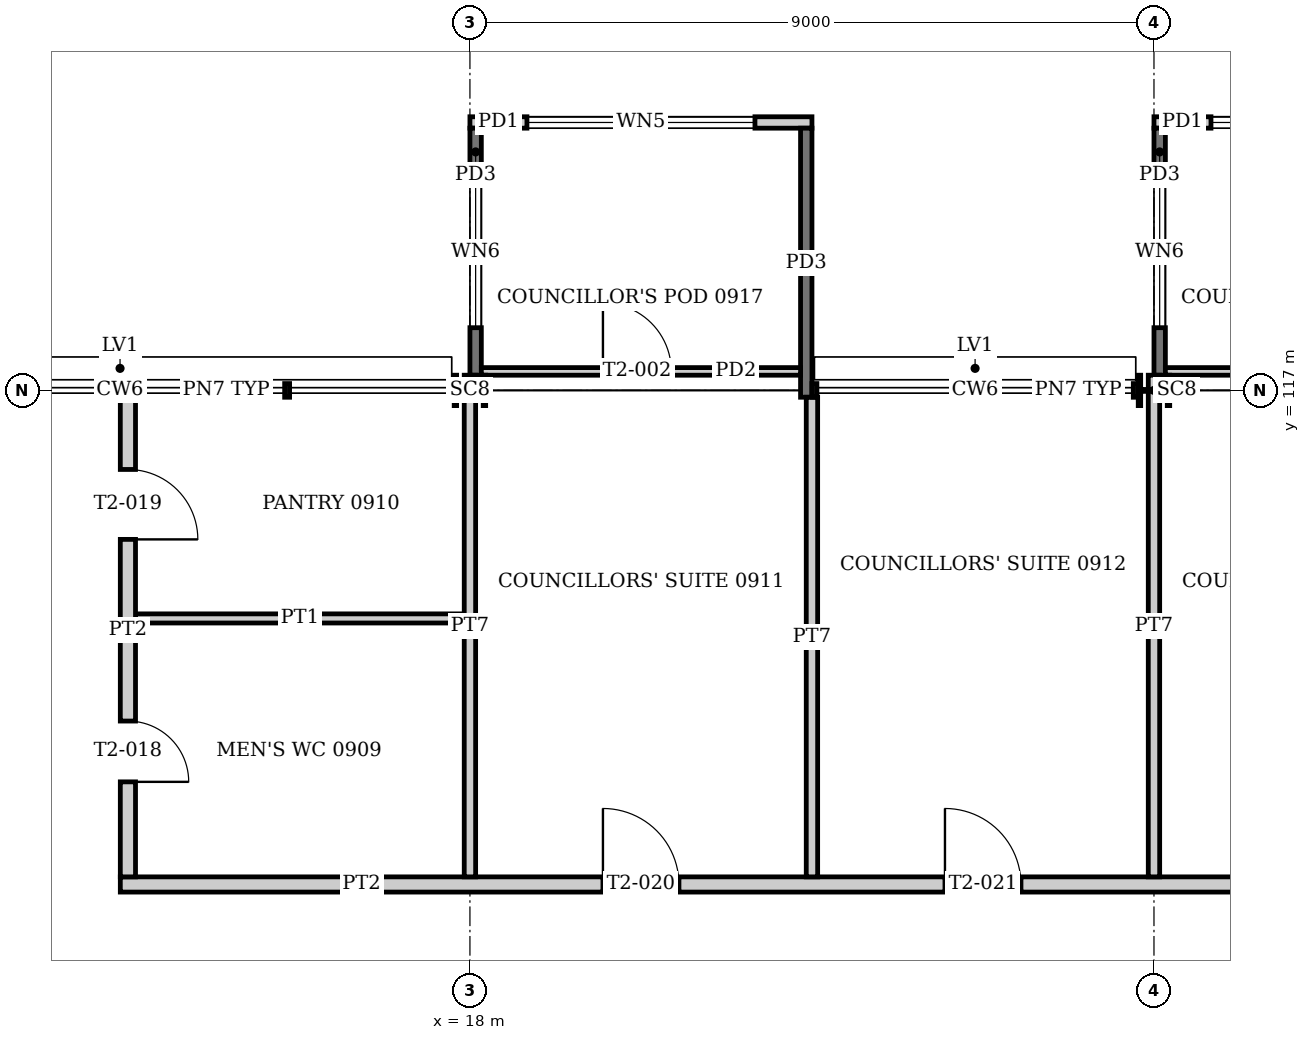
"""IFC4 building model, lengths in metres.
Left out: names, types, materials, properties, quantities, classifications, styles, units other than length and angle.
Written with IfcOpenShell. Run it as: python <this file> out.ifc"""

import sys

from ifc_helpers import new_model, si_unit, direction, frame, frame_2d, origin, origin_2d, place, context, subcontext, project, spatial, rectangle, i_section, extrude, element, fill, save


model = new_model("IFC4")
c1 = context("Model", 3, precision=1e-05, world=origin(), true_north=direction((0.0, 1.0)))
c2 = subcontext(c1, "Body", "Model", "MODEL_VIEW")
j1 = project(units=[si_unit("LENGTHUNIT", "METRE"), si_unit("PLANEANGLEUNIT", "RADIAN")], contexts=[c1])
p1 = place(None, origin())
s1 = spatial("IfcSite", under=j1, at=p1, CompositionType="ELEMENT")
p2 = place(p1, origin())
s2 = spatial("IfcBuilding", under=s1, at=p2, CompositionType="ELEMENT")
p3 = place(p2, frame((0.0, 0.0, 39.2)))
s3 = spatial("IfcBuildingStorey", under=s2, at=p3, CompositionType="ELEMENT", Elevation=39.2)
for number, where, z_axis, x_axis in (
    (1, (18.0, 117.0, 0.0), (0.0, 0.0, 1.0), (0.0, 1.0, 0.0)),
    (2, (27.0, 117.0, 0.0), (0.0, 0.0, 1.0), (0.0, 1.0, 0.0)),
):
    element("IfcColumn", number, at=place(p3, frame(where, z_axis=z_axis, x_axis=x_axis)), inside=s3, PredefinedType="COLUMN", context=c2, shape_type="SweptSolid", body=[
        extrude(i_section(OverallWidth=0.4, OverallDepth=0.414, WebThickness=0.025, FlangeThickness=0.032, at=origin_2d()), origin(), (0.0, 0.0, 1.0), 4.0),
    ])
p4 = place(p3, frame((18.0, 120.525, 0.0), z_axis=(0.0, 0.0, 1.0), x_axis=(1.0, 0.0, 0.0)))
e3 = element("IfcWall", 3, at=p4, inside=s3, PredefinedType="SOLIDWALL", context=c2, shape_type="SweptSolid", body=[
    extrude(rectangle(XDim=4.5, YDim=0.15, at=frame_2d((2.25, 0.0))), origin(), (0.0, 0.0, 1.0), 2.6),
])
p5 = place(p4, frame((0.75, 0.0, 0.9)))
e4 = element("IfcOpeningElement", 4, at=p5, cuts=e3, PredefinedType="OPENING", context=c2, shape_type="SweptSolid", body=[
    extrude(rectangle(XDim=3.0, YDim=1.4, at=frame_2d((1.5, 0.7))), frame((0.0, 0.085, 0.0), z_axis=(0.0, -1.0, 0.0), x_axis=(1.0, 0.0, 0.0)), (0.0, 0.0, 1.0), 0.17),
])
p6 = place(p3, frame((18.075, 120.45, -0.15), z_axis=(0.0, 0.0, 1.0), x_axis=(0.0, -1.0, 0.0)))
e5 = element("IfcWall", 5, at=p6, inside=s3, PredefinedType="SOLIDWALL", context=c2, shape_type="SweptSolid", body=[
    extrude(rectangle(XDim=3.25, YDim=0.15, at=frame_2d((1.625, 0.0))), origin(), (0.0, 0.0, 1.0), 2.75),
])
p7 = place(p6, frame((0.625, 0.0, 1.05)))
e6 = element("IfcOpeningElement", 6, at=p7, cuts=e5, PredefinedType="OPENING", context=c2, shape_type="SweptSolid", body=[
    extrude(rectangle(XDim=2.0, YDim=1.4, at=frame_2d((1.0, 0.7))), frame((0.0, 0.085, 0.0), z_axis=(0.0, -1.0, 0.0), x_axis=(1.0, 0.0, 0.0)), (0.0, 0.0, 1.0), 0.17),
])
p8 = place(p3, frame((22.425, 120.45, -0.15), z_axis=(0.0, 0.0, 1.0), x_axis=(0.0, -1.0, 0.0)))
e7 = element("IfcWall", 7, at=p8, inside=s3, PredefinedType="SOLIDWALL", context=c2, shape_type="SweptSolid", body=[
    extrude(rectangle(XDim=3.54, YDim=0.15, at=frame_2d((1.77, 0.0))), origin(), (0.0, 0.0, 1.0), 2.75),
])
p9 = place(p3, frame((18.15, 117.25, 0.0), z_axis=(0.0, 0.0, 1.0), x_axis=(1.0, 0.0, 0.0)))
e8 = element("IfcWall", 8, at=p9, inside=s3, PredefinedType="PARTITIONING", context=c2, shape_type="SweptSolid", body=[
    extrude(rectangle(XDim=4.2, YDim=0.1, at=frame_2d((2.1, 0.0))), origin(), (0.0, 0.0, 1.0), 2.6),
])
p10 = place(p9, frame((1.6, 0.0, 0.0)))
e9 = element("IfcOpeningElement", 9, at=p10, cuts=e8, PredefinedType="OPENING", context=c2, shape_type="SweptSolid", body=[
    extrude(rectangle(XDim=0.9, YDim=2.1, at=frame_2d((0.45, 1.05))), frame((0.0, 0.06, 0.0), z_axis=(0.0, -1.0, 0.0), x_axis=(1.0, 0.0, 0.0)), (0.0, 0.0, 1.0), 0.12),
])
p11 = place(p3, frame((27.0, 120.525, 0.0), z_axis=(0.0, 0.0, 1.0), x_axis=(1.0, 0.0, 0.0)))
e10 = element("IfcWall", 10, at=p11, inside=s3, PredefinedType="SOLIDWALL", context=c2, shape_type="SweptSolid", body=[
    extrude(rectangle(XDim=4.5, YDim=0.15, at=frame_2d((2.25, 0.0))), origin(), (0.0, 0.0, 1.0), 2.6),
])
p12 = place(p11, frame((0.75, 0.0, 0.9)))
e11 = element("IfcOpeningElement", 11, at=p12, cuts=e10, PredefinedType="OPENING", context=c2, shape_type="SweptSolid", body=[
    extrude(rectangle(XDim=3.0, YDim=1.4, at=frame_2d((1.5, 0.7))), frame((0.0, 0.085, 0.0), z_axis=(0.0, -1.0, 0.0), x_axis=(1.0, 0.0, 0.0)), (0.0, 0.0, 1.0), 0.17),
])
p13 = place(p3, frame((27.075, 120.45, -0.15), z_axis=(0.0, 0.0, 1.0), x_axis=(0.0, -1.0, 0.0)))
e12 = element("IfcWall", 12, at=p13, inside=s3, PredefinedType="SOLIDWALL", context=c2, shape_type="SweptSolid", body=[
    extrude(rectangle(XDim=3.25, YDim=0.15, at=frame_2d((1.625, 0.0))), origin(), (0.0, 0.0, 1.0), 2.75),
])
p14 = place(p13, frame((0.625, 0.0, 1.05)))
e13 = element("IfcOpeningElement", 13, at=p14, cuts=e12, PredefinedType="OPENING", context=c2, shape_type="SweptSolid", body=[
    extrude(rectangle(XDim=2.0, YDim=1.4, at=frame_2d((1.0, 0.7))), frame((0.0, 0.085, 0.0), z_axis=(0.0, -1.0, 0.0), x_axis=(1.0, 0.0, 0.0)), (0.0, 0.0, 1.0), 0.17),
])
p15 = place(p3, frame((27.15, 117.25, 0.0), z_axis=(0.0, 0.0, 1.0), x_axis=(1.0, 0.0, 0.0)))
e14 = element("IfcWall", 14, at=p15, inside=s3, PredefinedType="PARTITIONING", context=c2, shape_type="SweptSolid", body=[
    extrude(rectangle(XDim=4.2, YDim=0.1, at=frame_2d((2.1, 0.0))), origin(), (0.0, 0.0, 1.0), 2.6),
])
p16 = place(p15, frame((1.6, 0.0, 0.0)))
e15 = element("IfcOpeningElement", 15, at=p16, cuts=e14, PredefinedType="OPENING", context=c2, shape_type="SweptSolid", body=[
    extrude(rectangle(XDim=0.9, YDim=2.1, at=frame_2d((0.45, 1.05))), frame((0.0, 0.06, 0.0), z_axis=(0.0, -1.0, 0.0), x_axis=(1.0, 0.0, 0.0)), (0.0, 0.0, 1.0), 0.12),
])
p17 = place(p3, frame((13.4, 110.5, 0.0), z_axis=(0.0, 0.0, 1.0), x_axis=(1.0, 0.0, 0.0)))
e16 = element("IfcWall", 16, at=p17, inside=s3, PredefinedType="PARTITIONING", context=c2, shape_type="SweptSolid", body=[
    extrude(rectangle(XDim=27.2, YDim=0.2, at=frame_2d((13.6, 0.0))), origin(), (0.0, 0.0, 1.0), 3.05),
])
p18 = place(p17, frame((6.35, 0.0, 0.0)))
e17 = element("IfcOpeningElement", 17, at=p18, cuts=e16, PredefinedType="OPENING", context=c2, shape_type="SweptSolid", body=[
    extrude(rectangle(XDim=1.0, YDim=2.1, at=frame_2d((0.5, 1.05))), frame((0.0, 0.11, 0.0), z_axis=(0.0, -1.0, 0.0), x_axis=(1.0, 0.0, 0.0)), (0.0, 0.0, 1.0), 0.22),
])
p19 = place(p17, frame((10.85, 0.0, 0.0)))
e18 = element("IfcOpeningElement", 18, at=p19, cuts=e16, PredefinedType="OPENING", context=c2, shape_type="SweptSolid", body=[
    extrude(rectangle(XDim=1.0, YDim=2.1, at=frame_2d((0.5, 1.05))), frame((0.0, 0.11, 0.0), z_axis=(0.0, -1.0, 0.0), x_axis=(1.0, 0.0, 0.0)), (0.0, 0.0, 1.0), 0.22),
])
p20 = place(p17, frame((15.35, 0.0, 0.0)))
e19 = element("IfcOpeningElement", 19, at=p20, cuts=e16, PredefinedType="OPENING", context=c2, shape_type="SweptSolid", body=[
    extrude(rectangle(XDim=1.0, YDim=2.1, at=frame_2d((0.5, 1.05))), frame((0.0, 0.11, 0.0), z_axis=(0.0, -1.0, 0.0), x_axis=(1.0, 0.0, 0.0)), (0.0, 0.0, 1.0), 0.22),
])
p21 = place(p17, frame((19.85, 0.0, 0.0)))
e20 = element("IfcOpeningElement", 20, at=p21, cuts=e16, PredefinedType="OPENING", context=c2, shape_type="SweptSolid", body=[
    extrude(rectangle(XDim=1.0, YDim=2.1, at=frame_2d((0.5, 1.05))), frame((0.0, 0.11, 0.0), z_axis=(0.0, -1.0, 0.0), x_axis=(1.0, 0.0, 0.0)), (0.0, 0.0, 1.0), 0.22),
])
p22 = place(p17, frame((24.35, 0.0, 0.0)))
e21 = element("IfcOpeningElement", 21, at=p22, cuts=e16, PredefinedType="OPENING", context=c2, shape_type="SweptSolid", body=[
    extrude(rectangle(XDim=1.0, YDim=2.1, at=frame_2d((0.5, 1.05))), frame((0.0, 0.11, 0.0), z_axis=(0.0, -1.0, 0.0), x_axis=(1.0, 0.0, 0.0)), (0.0, 0.0, 1.0), 0.22),
])
p23 = place(p3, frame((13.6, 114.0, 0.0), z_axis=(0.0, 0.0, 1.0), x_axis=(1.0, 0.0, 0.0)))
e22 = element("IfcWall", 22, at=p23, inside=s3, PredefinedType="PARTITIONING", context=c2, shape_type="SweptSolid", body=[
    extrude(rectangle(XDim=4.325, YDim=0.12, at=frame_2d((2.163, 0.0))), origin(), (0.0, 0.0, 1.0), 3.05),
])
p24 = place(p3, frame((13.5, 110.6, 0.0), z_axis=(0.0, 0.0, 1.0), x_axis=(0.0, 1.0, 0.0)))
e23 = element("IfcWall", 23, at=p24, inside=s3, PredefinedType="PARTITIONING", context=c2, shape_type="SweptSolid", body=[
    extrude(rectangle(XDim=6.31, YDim=0.2, at=frame_2d((3.155, 0.0))), origin(), (0.0, 0.0, 1.0), 3.05),
])
p25 = place(p24, frame((1.25, 0.0, 0.0)))
e24 = element("IfcOpeningElement", 24, at=p25, cuts=e23, PredefinedType="OPENING", context=c2, shape_type="SweptSolid", body=[
    extrude(rectangle(XDim=0.8, YDim=2.1, at=frame_2d((0.4, 1.05))), frame((0.0, 0.11, 0.0), z_axis=(0.0, -1.0, 0.0), x_axis=(1.0, 0.0, 0.0)), (0.0, 0.0, 1.0), 0.22),
])
p26 = place(p24, frame((4.44, 0.0, 0.0)))
e25 = element("IfcOpeningElement", 25, at=p26, cuts=e23, PredefinedType="OPENING", context=c2, shape_type="SweptSolid", body=[
    extrude(rectangle(XDim=0.92, YDim=2.1, at=frame_2d((0.46, 1.05))), frame((0.0, 0.11, 0.0), z_axis=(0.0, -1.0, 0.0), x_axis=(1.0, 0.0, 0.0)), (0.0, 0.0, 1.0), 0.22),
])
p27 = place(p3, frame((18.0, 110.6, 0.0), z_axis=(0.0, 0.0, 1.0), x_axis=(0.0, 1.0, 0.0)))
e26 = element("IfcWall", 26, at=p27, inside=s3, PredefinedType="PARTITIONING", context=c2, shape_type="SweptSolid", body=[
    extrude(rectangle(XDim=6.6, YDim=0.15, at=frame_2d((3.3, 0.0))), origin(), (0.0, 0.0, 1.0), 3.05),
])
p28 = place(p3, frame((22.5, 110.6, 0.0), z_axis=(0.0, 0.0, 1.0), x_axis=(0.0, 1.0, 0.0)))
e27 = element("IfcWall", 27, at=p28, inside=s3, PredefinedType="PARTITIONING", context=c2, shape_type="SweptSolid", body=[
    extrude(rectangle(XDim=6.31, YDim=0.15, at=frame_2d((3.155, 0.0))), origin(), (0.0, 0.0, 1.0), 3.05),
])
p29 = place(p3, frame((27.0, 110.6, 0.0), z_axis=(0.0, 0.0, 1.0), x_axis=(0.0, 1.0, 0.0)))
e28 = element("IfcWall", 28, at=p29, inside=s3, PredefinedType="PARTITIONING", context=c2, shape_type="SweptSolid", body=[
    extrude(rectangle(XDim=6.6, YDim=0.15, at=frame_2d((3.3, 0.0))), origin(), (0.0, 0.0, 1.0), 3.05),
])
p30 = place(p5, origin())
e29 = element("IfcWindow", 29, at=p30, inside=s3, PartitioningType="SINGLE_PANEL", PredefinedType="WINDOW", context=c2, shape_type="SweptSolid", body=[
    extrude(rectangle(XDim=3.0, YDim=1.4, at=frame_2d((1.5, 0.7))), frame((0.0, 0.03, 0.0), z_axis=(0.0, -1.0, 0.0), x_axis=(1.0, 0.0, 0.0)), (0.0, 0.0, 1.0), 0.06),
])
fill(e4, e29)
p31 = place(p7, origin())
e30 = element("IfcWindow", 30, at=p31, inside=s3, PartitioningType="SINGLE_PANEL", PredefinedType="WINDOW", context=c2, shape_type="SweptSolid", body=[
    extrude(rectangle(XDim=2.0, YDim=1.4, at=frame_2d((1.0, 0.7))), frame((0.0, 0.03, 0.0), z_axis=(0.0, -1.0, 0.0), x_axis=(1.0, 0.0, 0.0)), (0.0, 0.0, 1.0), 0.06),
])
fill(e6, e30)
p32 = place(p10, origin())
e31 = element("IfcDoor", 31, at=p32, inside=s3, OperationType="SINGLE_SWING_LEFT", PredefinedType="DOOR", context=c2, shape_type="SweptSolid", body=[
    extrude(rectangle(XDim=0.9, YDim=2.1, at=frame_2d((0.45, 1.05))), frame((0.0, 0.025, 0.0), z_axis=(0.0, -1.0, 0.0), x_axis=(1.0, 0.0, 0.0)), (0.0, 0.0, 1.0), 0.05),
])
fill(e9, e31)
p33 = place(p12, origin())
e32 = element("IfcWindow", 32, at=p33, inside=s3, PartitioningType="SINGLE_PANEL", PredefinedType="WINDOW", context=c2, shape_type="SweptSolid", body=[
    extrude(rectangle(XDim=3.0, YDim=1.4, at=frame_2d((1.5, 0.7))), frame((0.0, 0.03, 0.0), z_axis=(0.0, -1.0, 0.0), x_axis=(1.0, 0.0, 0.0)), (0.0, 0.0, 1.0), 0.06),
])
fill(e11, e32)
p34 = place(p14, origin())
e33 = element("IfcWindow", 33, at=p34, inside=s3, PartitioningType="SINGLE_PANEL", PredefinedType="WINDOW", context=c2, shape_type="SweptSolid", body=[
    extrude(rectangle(XDim=2.0, YDim=1.4, at=frame_2d((1.0, 0.7))), frame((0.0, 0.03, 0.0), z_axis=(0.0, -1.0, 0.0), x_axis=(1.0, 0.0, 0.0)), (0.0, 0.0, 1.0), 0.06),
])
fill(e13, e33)
p35 = place(p25, frame((0.8, 0.0, 0.0), z_axis=(0.0, 0.0, 1.0), x_axis=(-1.0, 0.0, 0.0)))
e34 = element("IfcDoor", 34, at=p35, inside=s3, OperationType="SINGLE_SWING_RIGHT", PredefinedType="DOOR", context=c2, shape_type="SweptSolid", body=[
    extrude(rectangle(XDim=0.8, YDim=2.1, at=frame_2d((0.4, 1.05))), frame((0.0, 0.025, 0.0), z_axis=(0.0, -1.0, 0.0), x_axis=(1.0, 0.0, 0.0)), (0.0, 0.0, 1.0), 0.05),
])
fill(e24, e34)
p36 = place(p26, frame((0.92, 0.0, 0.0), z_axis=(0.0, 0.0, 1.0), x_axis=(-1.0, 0.0, 0.0)))
e35 = element("IfcDoor", 35, at=p36, inside=s3, OperationType="SINGLE_SWING_RIGHT", PredefinedType="DOOR", context=c2, shape_type="SweptSolid", body=[
    extrude(rectangle(XDim=0.92, YDim=2.1, at=frame_2d((0.46, 1.05))), frame((0.0, 0.025, 0.0), z_axis=(0.0, -1.0, 0.0), x_axis=(1.0, 0.0, 0.0)), (0.0, 0.0, 1.0), 0.05),
])
fill(e25, e35)
p37 = place(p18, origin())
e36 = element("IfcDoor", 36, at=p37, inside=s3, OperationType="SINGLE_SWING_LEFT", PredefinedType="DOOR", context=c2, shape_type="SweptSolid", body=[
    extrude(rectangle(XDim=1.0, YDim=2.1, at=frame_2d((0.5, 1.05))), frame((0.0, 0.025, 0.0), z_axis=(0.0, -1.0, 0.0), x_axis=(1.0, 0.0, 0.0)), (0.0, 0.0, 1.0), 0.05),
])
fill(e17, e36)
p38 = place(p19, origin())
e37 = element("IfcDoor", 37, at=p38, inside=s3, OperationType="SINGLE_SWING_LEFT", PredefinedType="DOOR", context=c2, shape_type="SweptSolid", body=[
    extrude(rectangle(XDim=1.0, YDim=2.1, at=frame_2d((0.5, 1.05))), frame((0.0, 0.025, 0.0), z_axis=(0.0, -1.0, 0.0), x_axis=(1.0, 0.0, 0.0)), (0.0, 0.0, 1.0), 0.05),
])
fill(e18, e37)
save(model, sys.argv[1])
